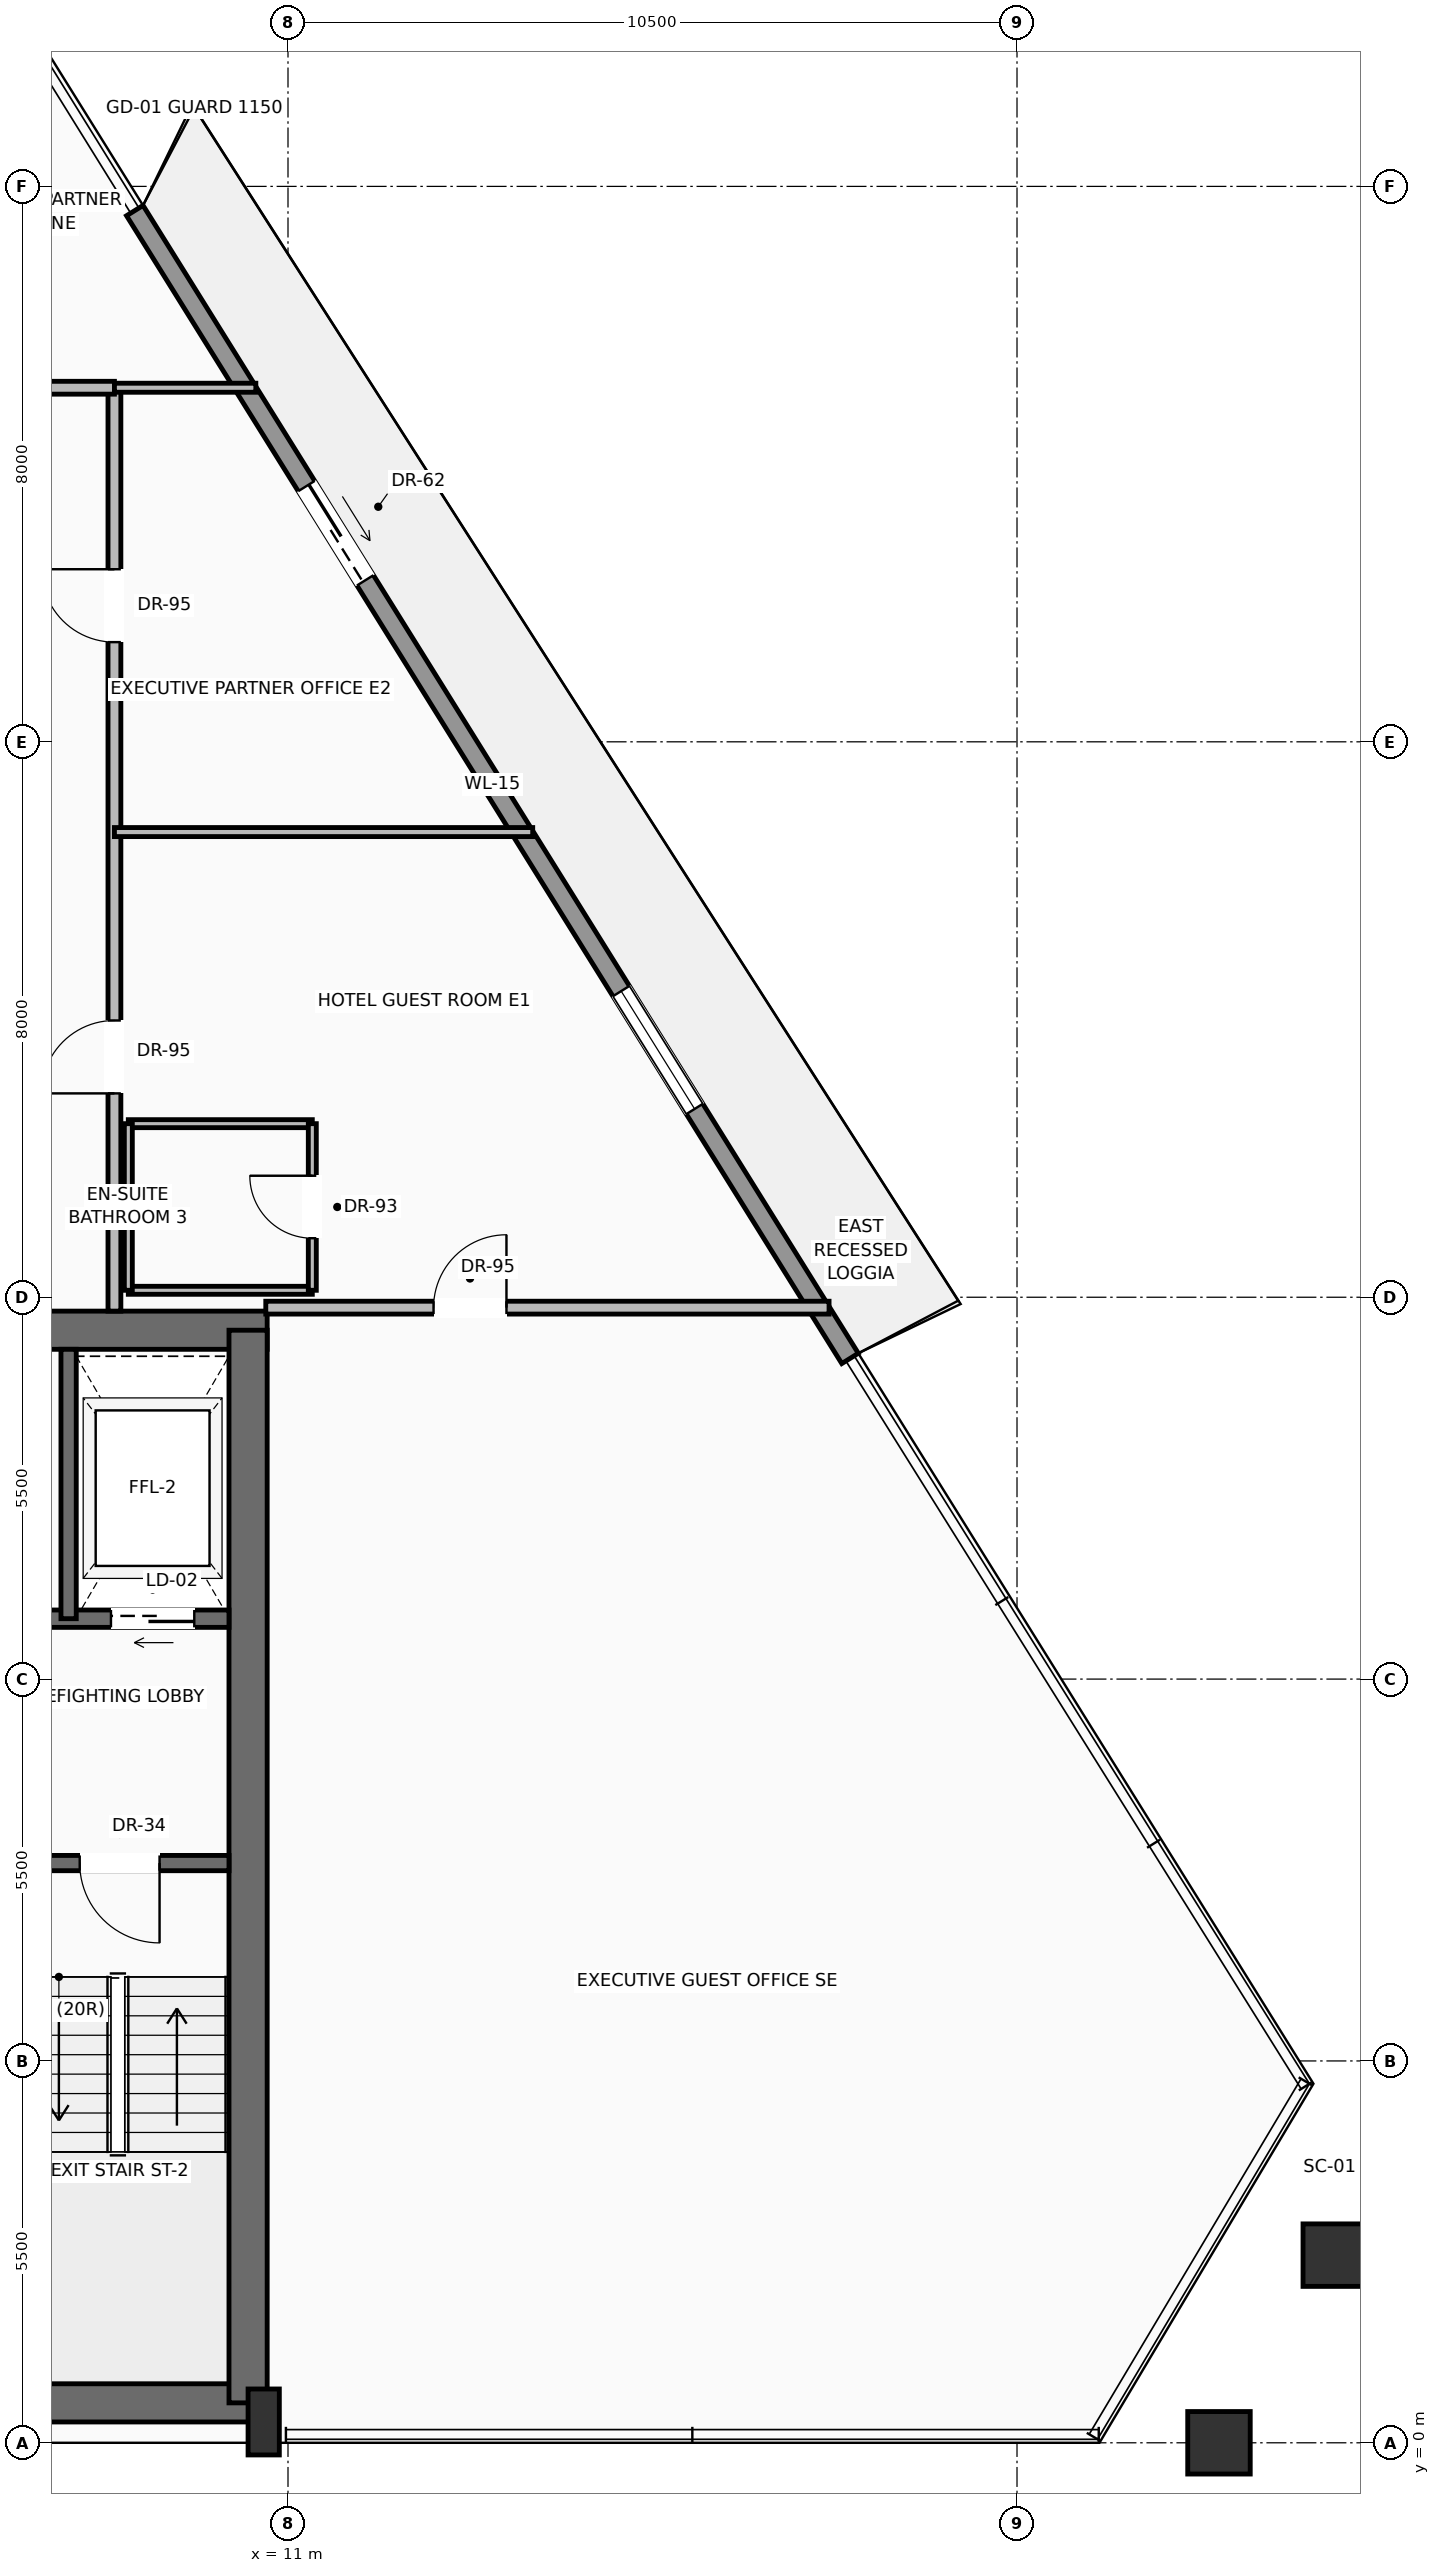
"""IFC4 building model, lengths in metres.
Left out: names, types, materials, properties, quantities, classifications, styles, units other than length and angle.
Written with IfcOpenShell. Run it as: python <this file> out.ifc"""

import sys

from ifc_helpers import new_model, si_unit, direction, frame, frame_2d, origin, origin_2d, place, context, subcontext, project, spatial, rectangle, hollow_rectangle, extrude, source, transform, mapped, element, fill, save


model = new_model("IFC4")
c1 = context("Model", 3, precision=1e-05, world=origin(), true_north=direction((0.0, 1.0)))
c2 = subcontext(c1, "Body", "Model", "MODEL_VIEW")
j1 = project(units=[si_unit("LENGTHUNIT", "METRE"), si_unit("PLANEANGLEUNIT", "RADIAN")], contexts=[c1])
p1 = place(None, origin())
s1 = spatial("IfcSite", under=j1, at=p1, CompositionType="ELEMENT")
p2 = place(p1, origin())
s2 = spatial("IfcBuilding", under=s1, at=p2, CompositionType="ELEMENT")
p3 = place(p2, frame((0.0, 0.0, 226.9)))
s3 = spatial("IfcBuildingStorey", under=s2, at=p3, CompositionType="ELEMENT", Elevation=226.9)
p4 = place(p3, frame((-10.65, 0.575, 0.0), z_axis=(0.0, 0.0, 1.0), x_axis=(1.0, 0.0, 0.0)))
e1 = element("IfcWall", 1, at=p4, inside=s3, PredefinedType="SHEAR", context=c2, shape_type="SweptSolid", body=[
    extrude(rectangle(XDim=21.3, YDim=0.55, at=frame_2d((10.65, 0.0))), origin(), (0.0, 0.0, 1.0), 3.24),
])
p5 = place(p3, frame((-10.7, 16.025, 0.0), z_axis=(0.0, 0.0, 1.0), x_axis=(1.0, 0.0, 0.0)))
e2 = element("IfcWall", 2, at=p5, inside=s3, PredefinedType="SHEAR", context=c2, shape_type="SweptSolid", body=[
    extrude(rectangle(XDim=21.4, YDim=0.55, at=frame_2d((10.7, 0.0))), origin(), (0.0, 0.0, 1.0), 3.24),
])
p6 = place(p5, frame((3.27, 0.0, 0.0)))
e3 = element("IfcOpeningElement", 3, at=p6, cuts=e2, PredefinedType="OPENING", context=c2, shape_type="SweptSolid", body=[
    extrude(rectangle(XDim=1.3, YDim=2.3, at=frame_2d((0.65, 1.15))), frame((0.0, 0.285, 0.0), z_axis=(0.0, -1.0, 0.0), x_axis=(1.0, 0.0, 0.0)), (0.0, 0.0, 1.0), 0.57),
])
p7 = place(p5, frame((9.7, 0.0, 0.0)))
e4 = element("IfcOpeningElement", 4, at=p7, cuts=e2, PredefinedType="OPENING", context=c2, shape_type="SweptSolid", body=[
    extrude(rectangle(XDim=2.0, YDim=2.4, at=frame_2d((1.0, 1.2))), frame((0.0, 0.285, 0.0), z_axis=(0.0, -1.0, 0.0), x_axis=(1.0, 0.0, 0.0)), (0.0, 0.0, 1.0), 0.57),
])
p8 = place(p3, frame((10.425, 0.575, 0.0), z_axis=(0.0, 0.0, 1.0), x_axis=(0.0, 1.0, 0.0)))
e5 = element("IfcWall", 5, at=p8, inside=s3, PredefinedType="SHEAR", context=c2, shape_type="SweptSolid", body=[
    extrude(rectangle(XDim=15.45, YDim=0.55, at=frame_2d((7.725, 0.0))), origin(), (0.0, 0.0, 1.0), 3.24),
])
m1 = source(origin(), c2, "Body", "SweptSolid", [
    extrude(rectangle(XDim=0.45, YDim=0.95, at=origin_2d()), origin(), (0.0, 0.0, 1.0), 3.45),
])
p9 = place(p3, frame((10.65, 0.3, 0.0), z_axis=(0.0, 0.0, 1.0), x_axis=(1.0, 0.0, 0.0)))
e6 = element("IfcColumn", 6, at=p9, inside=s3, PredefinedType="PILASTER", context=c2, shape_type="MappedRepresentation", body=[
    mapped(m1, transform((0.0, 0.0, 0.0), scale=1.0)),
])
m2 = source(origin(), c2, "Body", "SweptSolid", [
    extrude(hollow_rectangle(XDim=0.9, YDim=0.9, WallThickness=0.045, at=origin_2d()), origin(), (0.0, 0.0, 1.0), 3.441),
])
p10 = place(p3, frame((24.409, 0.0, 0.004), z_axis=(0.002412024766, 0.0, 0.999997091064), x_axis=(0.0, 1.0, 0.0)))
e7 = element("IfcColumn", 7, at=p10, inside=s3, PredefinedType="COLUMN", context=c2, shape_type="MappedRepresentation", body=[
    mapped(m2, transform((0.0, 0.0, 0.0), scale=1.0)),
])
m3 = source(origin(), c2, "Body", "SweptSolid", [
    extrude(hollow_rectangle(XDim=0.9, YDim=0.9, WallThickness=0.045, at=origin_2d()), origin(), (0.0, 0.0, 1.0), 3.442),
])
p11 = place(p3, frame((26.07, 2.703, 0.004), z_axis=(-0.009008030839, -0.016668403521, 0.999820493741), x_axis=(0.879748834705, -0.475438731947, 0.0)))
e8 = element("IfcColumn", 8, at=p11, inside=s3, PredefinedType="COLUMN", context=c2, shape_type="MappedRepresentation", body=[
    mapped(m3, transform((0.0, 0.0, 0.0), scale=1.0)),
])
p12 = place(p3, frame((8.793, 32.152, 0.0), z_axis=(0.0, 0.0, 1.0), x_axis=(0.528841469928, -0.848720625226, 0.0)))
e9 = element("IfcWall", 9, at=p12, inside=s3, PredefinedType="SOLIDWALL", context=c2, shape_type="SweptSolid", body=[
    extrude(rectangle(XDim=19.48, YDim=0.28, at=frame_2d((9.74, 0.0))), origin(), (0.0, 0.0, 1.0), 2.82),
])
p13 = place(p12, frame((4.675, 0.0, 0.0)))
e10 = element("IfcOpeningElement", 10, at=p13, cuts=e9, PredefinedType="OPENING", context=c2, shape_type="SweptSolid", body=[
    extrude(rectangle(XDim=1.6, YDim=2.35, at=frame_2d((0.8, 1.175))), frame((0.0, 0.15, 0.0), z_axis=(0.0, -1.0, 0.0), x_axis=(1.0, 0.0, 0.0)), (0.0, 0.0, 1.0), 0.3),
])
p14 = place(p12, frame((13.246, 0.0, 0.9)))
e11 = element("IfcOpeningElement", 11, at=p14, cuts=e9, PredefinedType="OPENING", context=c2, shape_type="SweptSolid", body=[
    extrude(rectangle(XDim=2.0, YDim=1.75, at=frame_2d((1.0, 0.875))), frame((0.0, 0.15, 0.0), z_axis=(0.0, -1.0, 0.0), x_axis=(1.0, 0.0, 0.0)), (0.0, 0.0, 1.0), 0.3),
])
p15 = place(p3, frame((10.15, 8.35, 0.0), z_axis=(0.0, 0.0, 1.0), x_axis=(-1.0, 0.0, 0.0)))
e12 = element("IfcWall", 12, at=p15, inside=s3, PredefinedType="SOLIDWALL", context=c2, shape_type="SweptSolid", body=[
    extrude(rectangle(XDim=4.65, YDim=0.22, at=frame_2d((2.325, 0.0))), origin(), (0.0, 0.0, 1.0), 3.24),
])
p16 = place(p15, frame((1.0, 0.0, 0.0)))
e13 = element("IfcOpeningElement", 13, at=p16, cuts=e12, PredefinedType="OPENING", context=c2, shape_type="SweptSolid", body=[
    extrude(rectangle(XDim=1.15, YDim=2.2, at=frame_2d((0.575, 1.1))), frame((0.0, 0.12, 0.0), z_axis=(0.0, -1.0, 0.0), x_axis=(1.0, 0.0, 0.0)), (0.0, 0.0, 1.0), 0.24),
])
p17 = place(p3, frame((10.15, 11.87, 0.0), z_axis=(0.0, 0.0, 1.0), x_axis=(-1.0, 0.0, 0.0)))
e14 = element("IfcWall", 14, at=p17, inside=s3, PredefinedType="SOLIDWALL", context=c2, shape_type="SweptSolid", body=[
    extrude(rectangle(XDim=4.65, YDim=0.25, at=frame_2d((2.325, 0.0))), origin(), (0.0, 0.0, 1.0), 3.24),
])
p18 = place(p17, frame((0.5, 0.0, 0.0)))
e15 = element("IfcOpeningElement", 15, at=p18, cuts=e14, PredefinedType="OPENING", context=c2, shape_type="SweptSolid", body=[
    extrude(rectangle(XDim=1.2, YDim=2.25, at=frame_2d((0.6, 1.125))), frame((0.0, 0.135, 0.0), z_axis=(0.0, -1.0, 0.0), x_axis=(1.0, 0.0, 0.0)), (0.0, 0.0, 1.0), 0.27),
])
p19 = place(p3, frame((7.84, 11.87, 0.0), z_axis=(0.0, 0.0, 1.0), x_axis=(0.0, 1.0, 0.0)))
e16 = element("IfcWall", 16, at=p19, inside=s3, PredefinedType="SOLIDWALL", context=c2, shape_type="SweptSolid", body=[
    extrude(rectangle(XDim=3.88, YDim=0.22, at=frame_2d((1.94, 0.0))), origin(), (0.0, 0.0, 1.0), 3.24),
])
p20 = place(p3, frame((8.5, 16.3, 0.0), z_axis=(0.0, 0.0, 1.0), x_axis=(0.0, 1.0, 0.0)))
e17 = element("IfcWall", 17, at=p20, inside=s3, PredefinedType="PARTITIONING", context=c2, shape_type="SweptSolid", body=[
    extrude(rectangle(XDim=13.3, YDim=0.185, at=frame_2d((6.65, 0.0))), origin(), (0.0, 0.0, 1.0), 3.232),
])
p21 = place(p20, frame((3.136, 0.0, 0.0)))
e18 = element("IfcOpeningElement", 18, at=p21, cuts=e17, PredefinedType="OPENING", context=c2, shape_type="SweptSolid", body=[
    extrude(rectangle(XDim=1.05, YDim=2.25, at=frame_2d((0.525, 1.125))), frame((0.0, 0.103, 0.0), z_axis=(0.0, -1.0, 0.0), x_axis=(1.0, 0.0, 0.0)), (0.0, 0.0, 1.0), 0.205),
])
p22 = place(p20, frame((9.636, 0.0, 0.0)))
e19 = element("IfcOpeningElement", 19, at=p22, cuts=e17, PredefinedType="OPENING", context=c2, shape_type="SweptSolid", body=[
    extrude(rectangle(XDim=1.05, YDim=2.25, at=frame_2d((0.525, 1.125))), frame((0.0, 0.103, 0.0), z_axis=(0.0, -1.0, 0.0), x_axis=(1.0, 0.0, 0.0)), (0.0, 0.0, 1.0), 0.205),
])
p23 = place(p3, frame((-8.5, 29.6, 0.0), z_axis=(0.0, 0.0, 1.0), x_axis=(1.0, 0.0, 0.0)))
e20 = element("IfcWall", 20, at=p23, inside=s3, PredefinedType="PARTITIONING", context=c2, shape_type="SweptSolid", body=[
    extrude(rectangle(XDim=17.0, YDim=0.185, at=frame_2d((8.5, 0.0))), origin(), (0.0, 0.0, 1.0), 3.232),
])
p24 = place(p23, frame((3.698, 0.0, 0.0)))
e21 = element("IfcOpeningElement", 21, at=p24, cuts=e20, PredefinedType="OPENING", context=c2, shape_type="SweptSolid", body=[
    extrude(rectangle(XDim=1.05, YDim=2.25, at=frame_2d((0.525, 1.125))), frame((0.0, 0.103, 0.0), z_axis=(0.0, -1.0, 0.0), x_axis=(1.0, 0.0, 0.0)), (0.0, 0.0, 1.0), 0.205),
])
p25 = place(p23, frame((7.975, 0.0, 0.0)))
e22 = element("IfcOpeningElement", 22, at=p25, cuts=e20, PredefinedType="OPENING", context=c2, shape_type="SweptSolid", body=[
    extrude(rectangle(XDim=1.05, YDim=2.25, at=frame_2d((0.525, 1.125))), frame((0.0, 0.103, 0.0), z_axis=(0.0, -1.0, 0.0), x_axis=(1.0, 0.0, 0.0)), (0.0, 0.0, 1.0), 0.205),
])
p26 = place(p23, frame((12.252, 0.0, 0.0)))
e23 = element("IfcOpeningElement", 23, at=p26, cuts=e20, PredefinedType="OPENING", context=c2, shape_type="SweptSolid", body=[
    extrude(rectangle(XDim=1.05, YDim=2.25, at=frame_2d((0.525, 1.125))), frame((0.0, 0.103, 0.0), z_axis=(0.0, -1.0, 0.0), x_axis=(1.0, 0.0, 0.0)), (0.0, 0.0, 1.0), 0.205),
])
p27 = place(p23, frame((14.698, 0.0, 0.0)))
e24 = element("IfcOpeningElement", 24, at=p27, cuts=e20, PredefinedType="OPENING", context=c2, shape_type="SweptSolid", body=[
    extrude(rectangle(XDim=1.05, YDim=2.25, at=frame_2d((0.525, 1.125))), frame((0.0, 0.103, 0.0), z_axis=(0.0, -1.0, 0.0), x_axis=(1.0, 0.0, 0.0)), (0.0, 0.0, 1.0), 0.205),
])
p28 = place(p23, frame((1.252, 0.0, 0.0)))
e25 = element("IfcOpeningElement", 25, at=p28, cuts=e20, PredefinedType="OPENING", context=c2, shape_type="SweptSolid", body=[
    extrude(rectangle(XDim=1.05, YDim=2.25, at=frame_2d((0.525, 1.125))), frame((0.0, 0.103, 0.0), z_axis=(0.0, -1.0, 0.0), x_axis=(1.0, 0.0, 0.0)), (0.0, 0.0, 1.0), 0.205),
])
p29 = place(p3, frame((10.68, 16.35, 0.0), z_axis=(0.0, 0.0, 1.0), x_axis=(1.0, 0.0, 0.0)))
e26 = element("IfcWall", 26, at=p29, inside=s3, PredefinedType="PARTITIONING", context=c2, shape_type="SweptSolid", body=[
    extrude(rectangle(XDim=8.113, YDim=0.185, at=frame_2d((4.056, 0.0))), origin(), (0.0, 0.0, 1.0), 3.232),
])
p30 = place(p29, frame((2.417, 0.0, 0.0)))
e27 = element("IfcOpeningElement", 27, at=p30, cuts=e26, PredefinedType="OPENING", context=c2, shape_type="SweptSolid", body=[
    extrude(rectangle(XDim=1.05, YDim=2.25, at=frame_2d((0.525, 1.125))), frame((0.0, 0.103, 0.0), z_axis=(0.0, -1.0, 0.0), x_axis=(1.0, 0.0, 0.0)), (0.0, 0.0, 1.0), 0.205),
])
p31 = place(p3, frame((8.5, 29.6, 0.0), z_axis=(0.0, 0.0, 1.0), x_axis=(1.0, 0.0, 0.0)))
e28 = element("IfcWall", 28, at=p31, inside=s3, PredefinedType="PARTITIONING", context=c2, shape_type="SweptSolid", body=[
    extrude(rectangle(XDim=2.037, YDim=0.13, at=frame_2d((1.018, 0.0))), origin(), (0.0, 0.0, 1.0), 3.232),
])
for number, where, z_axis, x_axis in (
    (29, (8.7, 16.6, 0.0), (0.0, 0.0, 1.0), (1.0, 0.0, 0.0)),
    (30, (8.7, 19.0, 0.0), (0.0, 0.0, 1.0), (1.0, 0.0, 0.0)),
):
    element("IfcWall", number, at=place(p3, frame(where, z_axis=z_axis, x_axis=x_axis)), inside=s3, PredefinedType="PARTITIONING", context=c2, shape_type="SweptSolid", body=[
        extrude(rectangle(XDim=2.65, YDim=0.115, at=frame_2d((1.325, 0.0))), origin(), (0.0, 0.0, 1.0), 3.232),
    ])
p32 = place(p3, frame((8.7, 16.6, 0.0), z_axis=(0.0, 0.0, 1.0), x_axis=(0.0, 1.0, 0.0)))
e31 = element("IfcWall", 31, at=p32, inside=s3, PredefinedType="PARTITIONING", context=c2, shape_type="SweptSolid", body=[
    extrude(rectangle(XDim=2.4, YDim=0.115, at=frame_2d((1.2, 0.0))), origin(), (0.0, 0.0, 1.0), 3.232),
])
p33 = place(p3, frame((11.35, 16.6, 0.0), z_axis=(0.0, 0.0, 1.0), x_axis=(0.0, 1.0, 0.0)))
e32 = element("IfcWall", 32, at=p33, inside=s3, PredefinedType="PARTITIONING", context=c2, shape_type="SweptSolid", body=[
    extrude(rectangle(XDim=2.4, YDim=0.115, at=frame_2d((1.2, 0.0))), origin(), (0.0, 0.0, 1.0), 3.232),
])
p34 = place(p33, frame((0.75, 0.0, 0.0)))
e33 = element("IfcOpeningElement", 33, at=p34, cuts=e32, PredefinedType="OPENING", context=c2, shape_type="SweptSolid", body=[
    extrude(rectangle(XDim=0.9, YDim=2.15, at=frame_2d((0.45, 1.075))), frame((0.0, 0.067, 0.0), z_axis=(0.0, -1.0, 0.0), x_axis=(1.0, 0.0, 0.0)), (0.0, 0.0, 1.0), 0.135),
])
p35 = place(p3, frame((8.5, 23.2, 0.0), z_axis=(0.0, 0.0, 1.0), x_axis=(1.0, 0.0, 0.0)))
e34 = element("IfcWall", 34, at=p35, inside=s3, PredefinedType="PARTITIONING", context=c2, shape_type="SweptSolid", body=[
    extrude(rectangle(XDim=6.024, YDim=0.13, at=frame_2d((3.012, 0.0))), origin(), (0.0, 0.0, 1.0), 3.232),
])
m4 = source(origin(), c2, "Body", "SweptSolid", [
    extrude(rectangle(XDim=1.6, YDim=2.35, at=frame_2d((0.8, 1.175))), frame((0.0, 0.025, 0.0), z_axis=(0.0, -1.0, 0.0), x_axis=(1.0, 0.0, 0.0)), (0.0, 0.0, 1.0), 0.05),
])
p36 = place(p13, origin())
e35 = element("IfcDoor", 35, at=p36, inside=s3, OperationType="SLIDING_TO_RIGHT", PredefinedType="DOOR", context=c2, shape_type="MappedRepresentation", body=[
    mapped(m4, transform((0.0, 0.0, 0.0), scale=1.0)),
])
fill(e10, e35)
m5 = source(origin(), c2, "Body", "SweptSolid", [
    extrude(rectangle(XDim=2.0, YDim=1.75, at=frame_2d((1.0, 0.875))), frame((0.0, 0.03, 0.0), z_axis=(0.0, -1.0, 0.0), x_axis=(1.0, 0.0, 0.0)), (0.0, 0.0, 1.0), 0.06),
])
p37 = place(p14, origin())
e36 = element("IfcWindow", 36, at=p37, inside=s3, PartitioningType="SINGLE_PANEL", PredefinedType="WINDOW", context=c2, shape_type="MappedRepresentation", body=[
    mapped(m5, transform((0.0, 0.0, 0.0), scale=1.0)),
])
fill(e11, e36)
m6 = source(origin(), c2, "Body", "SweptSolid", [
    extrude(rectangle(XDim=1.15, YDim=2.2, at=frame_2d((0.575, 1.1))), frame((0.0, 0.025, 0.0), z_axis=(0.0, -1.0, 0.0), x_axis=(1.0, 0.0, 0.0)), (0.0, 0.0, 1.0), 0.05),
])
p38 = place(p16, origin())
e37 = element("IfcDoor", 37, at=p38, inside=s3, OperationType="SINGLE_SWING_LEFT", PredefinedType="DOOR", context=c2, shape_type="MappedRepresentation", body=[
    mapped(m6, transform((0.0, 0.0, 0.0), scale=1.0)),
])
fill(e13, e37)
m7 = source(origin(), c2, "Body", "SweptSolid", [
    extrude(rectangle(XDim=1.2, YDim=2.25, at=frame_2d((0.6, 1.125))), frame((0.0, 0.025, 0.0), z_axis=(0.0, -1.0, 0.0), x_axis=(1.0, 0.0, 0.0)), (0.0, 0.0, 1.0), 0.05),
])
p39 = place(p18, origin())
e38 = element("IfcDoor", 38, at=p39, inside=s3, OperationType="SLIDING_TO_RIGHT", PredefinedType="DOOR", context=c2, shape_type="MappedRepresentation", body=[
    mapped(m7, transform((0.0, 0.0, 0.0), scale=1.0)),
])
fill(e15, e38)
m8 = source(origin(), c2, "Body", "SweptSolid", [
    extrude(rectangle(XDim=1.05, YDim=2.25, at=frame_2d((0.525, 1.125))), frame((0.0, 0.025, 0.0), z_axis=(0.0, -1.0, 0.0), x_axis=(1.0, 0.0, 0.0)), (0.0, 0.0, 1.0), 0.05),
])
p40 = place(p30, origin())
e39 = element("IfcDoor", 39, at=p40, inside=s3, OperationType="SINGLE_SWING_RIGHT", PredefinedType="DOOR", context=c2, shape_type="MappedRepresentation", body=[
    mapped(m8, transform((0.0, 0.0, 0.0), scale=1.0)),
])
fill(e27, e39)
m9 = source(origin(), c2, "Body", "SweptSolid", [
    extrude(rectangle(XDim=0.9, YDim=2.15, at=frame_2d((0.45, 1.075))), frame((0.0, 0.025, 0.0), z_axis=(0.0, -1.0, 0.0), x_axis=(1.0, 0.0, 0.0)), (0.0, 0.0, 1.0), 0.05),
])
p41 = place(p34, origin())
e40 = element("IfcDoor", 40, at=p41, inside=s3, OperationType="SINGLE_SWING_RIGHT", PredefinedType="DOOR", context=c2, shape_type="MappedRepresentation", body=[
    mapped(m9, transform((0.0, 0.0, 0.0), scale=1.0)),
])
fill(e33, e40)
p42 = place(p21, origin())
e41 = element("IfcDoor", 41, at=p42, inside=s3, OperationType="SINGLE_SWING_LEFT", PredefinedType="DOOR", context=c2, shape_type="MappedRepresentation", body=[
    mapped(m8, transform((0.0, 0.0, 0.0), scale=1.0)),
])
fill(e18, e41)
p43 = place(p22, origin())
e42 = element("IfcDoor", 42, at=p43, inside=s3, OperationType="SINGLE_SWING_RIGHT", PredefinedType="DOOR", context=c2, shape_type="MappedRepresentation", body=[
    mapped(m8, transform((0.0, 0.0, 0.0), scale=1.0)),
])
fill(e19, e42)
save(model, sys.argv[1])
